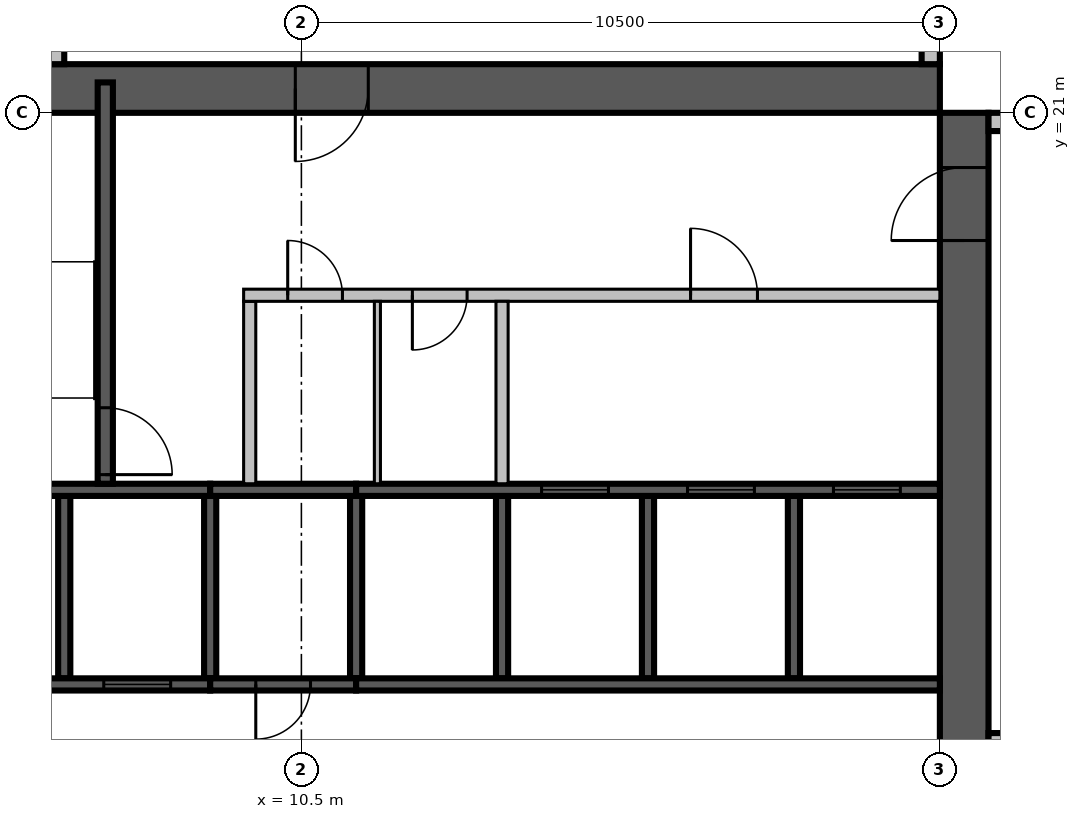
"""IFC4 building model, lengths in metres.
Left out: names, types, materials, properties, quantities, classifications, styles, units other than length and angle.
Written with IfcOpenShell. Run it as: python <this file> out.ifc"""

import sys

from ifc_helpers import new_model, si_unit, direction, frame, frame_2d, origin, place, context, subcontext, project, spatial, rectangle, extrude, source, transform, mapped, element, fill, save


model = new_model("IFC4")
c1 = context("Model", 3, precision=1e-05, world=origin(), true_north=direction((0.0, 1.0)))
c2 = subcontext(c1, "Body", "Model", "MODEL_VIEW")
j1 = project(units=[si_unit("LENGTHUNIT", "METRE"), si_unit("PLANEANGLEUNIT", "RADIAN")], contexts=[c1])
p1 = place(None, origin())
s1 = spatial("IfcSite", under=j1, at=p1, CompositionType="ELEMENT")
p2 = place(p1, origin())
s2 = spatial("IfcBuilding", under=s1, at=p2, CompositionType="ELEMENT")
p3 = place(p2, frame((0.0, 0.0, 212.0)))
s3 = spatial("IfcBuildingStorey", under=s2, at=p3, CompositionType="ELEMENT", Elevation=212.0)
m1 = source(origin(), c2, "Body", "SweptSolid", [
    extrude(rectangle(XDim=16.8, YDim=0.8, at=frame_2d((8.4, 0.0))), origin(), (0.0, 0.0, 1.0), 3.8),
])
p4 = place(p3, frame((21.4, 4.2, 0.0), z_axis=(0.0, 0.0, 1.0), x_axis=(0.0, 1.0, 0.0)))
e1 = element("IfcWall", 1, at=p4, inside=s3, PredefinedType="SHEAR", context=c2, shape_type="MappedRepresentation", body=[
    mapped(m1, transform((0.0, 0.0, 0.0), scale=1.0)),
])
m2 = source(origin(), c2, "Body", "SweptSolid", [
    extrude(rectangle(XDim=1.2, YDim=2.1, at=frame_2d((0.6, 1.05))), frame((0.0, 0.41, 0.0), z_axis=(0.0, -1.0, 0.0), x_axis=(1.0, 0.0, 0.0)), (0.0, 0.0, 1.0), 0.82),
])
p5 = place(p4, frame((14.7, 0.0, 0.0)))
e2 = element("IfcOpeningElement", 2, at=p5, cuts=e1, PredefinedType="OPENING", context=c2, shape_type="MappedRepresentation", body=[
    mapped(m2, transform((0.0, 0.0, 0.0), scale=1.0)),
])
p6 = place(p3, frame((4.2, 21.4, 0.0), z_axis=(0.0, 0.0, 1.0), x_axis=(1.0, 0.0, 0.0)))
e3 = element("IfcWall", 3, at=p6, inside=s3, PredefinedType="SHEAR", context=c2, shape_type="MappedRepresentation", body=[
    mapped(m1, transform((0.0, 0.0, 0.0), scale=1.0)),
])
p7 = place(p6, frame((6.2, 0.0, 0.0)))
e4 = element("IfcOpeningElement", 4, at=p7, cuts=e3, PredefinedType="OPENING", context=c2, shape_type="MappedRepresentation", body=[
    mapped(m2, transform((0.0, 0.0, 0.0), scale=1.0)),
])
m3 = source(origin(), c2, "Body", "SweptSolid", [
    extrude(rectangle(XDim=7.15, YDim=0.3, at=frame_2d((3.575, 0.0))), origin(), (0.0, 0.0, 1.0), 3.4),
])
p8 = place(p3, frame((21.8, 10.65, 0.0), z_axis=(0.0, 0.0, 1.0), x_axis=(1.0, 0.0, 0.0)))
e5 = element("IfcWall", 5, at=p8, inside=s3, PredefinedType="STANDARD", context=c2, shape_type="MappedRepresentation", body=[
    mapped(m3, transform((0.0, 0.0, 0.0), scale=1.0)),
])
m4 = source(origin(), c2, "Body", "SweptSolid", [
    extrude(rectangle(XDim=1.8, YDim=2.3, at=frame_2d((0.9, 1.15))), frame((0.0, 0.16, 0.0), z_axis=(0.0, -1.0, 0.0), x_axis=(1.0, 0.0, 0.0)), (0.0, 0.0, 1.0), 0.32),
])
p9 = place(p8, frame((0.4, 0.0, 0.6)))
e6 = element("IfcOpeningElement", 6, at=p9, cuts=e5, PredefinedType="OPENING", context=c2, shape_type="MappedRepresentation", body=[
    mapped(m4, transform((0.0, 0.0, 0.0), scale=1.0)),
])
m5 = source(origin(), c2, "Body", "SweptSolid", [
    extrude(rectangle(XDim=3.0, YDim=2.3, at=frame_2d((1.5, 1.15))), frame((0.0, 0.16, 0.0), z_axis=(0.0, -1.0, 0.0), x_axis=(1.0, 0.0, 0.0)), (0.0, 0.0, 1.0), 0.32),
])
p10 = place(p8, frame((4.0, 0.0, 0.6)))
e7 = element("IfcOpeningElement", 7, at=p10, cuts=e5, PredefinedType="OPENING", context=c2, shape_type="MappedRepresentation", body=[
    mapped(m5, transform((0.0, 0.0, 0.0), scale=1.0)),
])
p11 = place(p3, frame((28.95, 20.85, 0.0), z_axis=(0.0, 0.0, 1.0), x_axis=(-1.0, 0.0, 0.0)))
e8 = element("IfcWall", 8, at=p11, inside=s3, PredefinedType="STANDARD", context=c2, shape_type="MappedRepresentation", body=[
    mapped(m3, transform((0.0, 0.0, 0.0), scale=1.0)),
])
p12 = place(p11, frame((0.15, 0.0, 0.6)))
e9 = element("IfcOpeningElement", 9, at=p12, cuts=e8, PredefinedType="OPENING", context=c2, shape_type="MappedRepresentation", body=[
    mapped(m5, transform((0.0, 0.0, 0.0), scale=1.0)),
])
p13 = place(p11, frame((4.95, 0.0, 0.6)))
e10 = element("IfcOpeningElement", 10, at=p13, cuts=e8, PredefinedType="OPENING", context=c2, shape_type="MappedRepresentation", body=[
    mapped(m4, transform((0.0, 0.0, 0.0), scale=1.0)),
])
p14 = place(p3, frame((20.85, 21.8, 0.0), z_axis=(0.0, 0.0, 1.0), x_axis=(0.0, 1.0, 0.0)))
e11 = element("IfcWall", 11, at=p14, inside=s3, PredefinedType="STANDARD", context=c2, shape_type="MappedRepresentation", body=[
    mapped(m3, transform((0.0, 0.0, 0.0), scale=1.0)),
])
p15 = place(p14, frame((0.4, 0.0, 0.6)))
e12 = element("IfcOpeningElement", 12, at=p15, cuts=e11, PredefinedType="OPENING", context=c2, shape_type="MappedRepresentation", body=[
    mapped(m4, transform((0.0, 0.0, 0.0), scale=1.0)),
])
m6 = source(origin(), c2, "Body", "SweptSolid", [
    extrude(rectangle(XDim=1.0, YDim=2.1, at=frame_2d((0.5, 1.05))), frame((0.0, 0.16, 0.0), z_axis=(0.0, -1.0, 0.0), x_axis=(1.0, 0.0, 0.0)), (0.0, 0.0, 1.0), 0.32),
])
p16 = place(p14, frame((5.0, 0.0, 0.0)))
e13 = element("IfcOpeningElement", 13, at=p16, cuts=e11, PredefinedType="OPENING", context=c2, shape_type="MappedRepresentation", body=[
    mapped(m6, transform((0.0, 0.0, 0.0), scale=1.0)),
])
m7 = source(origin(), c2, "Body", "SweptSolid", [
    extrude(rectangle(XDim=16.6, YDim=0.3, at=frame_2d((8.3, 0.0))), origin(), (0.0, 0.0, 1.0), 3.4),
])
p17 = place(p3, frame((6.45, 38.4, 0.0), z_axis=(0.0, 0.0, 1.0), x_axis=(0.0, -1.0, 0.0)))
e14 = element("IfcWall", 14, at=p17, inside=s3, PredefinedType="STANDARD", context=c2, shape_type="MappedRepresentation", body=[
    mapped(m7, transform((0.0, 0.0, 0.0), scale=1.0)),
])
p18 = place(p17, frame((1.15, 0.0, 0.6)))
e15 = element("IfcOpeningElement", 15, at=p18, cuts=e14, PredefinedType="OPENING", context=c2, shape_type="MappedRepresentation", body=[
    mapped(m4, transform((0.0, 0.0, 0.0), scale=1.0)),
])
p19 = place(p17, frame((9.438, 0.0, 0.6)))
e16 = element("IfcOpeningElement", 16, at=p19, cuts=e14, PredefinedType="OPENING", context=c2, shape_type="MappedRepresentation", body=[
    mapped(m4, transform((0.0, 0.0, 0.0), scale=1.0)),
])
m8 = source(origin(), c2, "Body", "SweptSolid", [
    extrude(rectangle(XDim=1.2, YDim=2.3, at=frame_2d((0.6, 1.15))), frame((0.0, 0.16, 0.0), z_axis=(0.0, -1.0, 0.0), x_axis=(1.0, 0.0, 0.0)), (0.0, 0.0, 1.0), 0.32),
])
p20 = place(p17, frame((14.338, 0.0, 0.6)))
e17 = element("IfcOpeningElement", 17, at=p20, cuts=e14, PredefinedType="OPENING", context=c2, shape_type="MappedRepresentation", body=[
    mapped(m8, transform((0.0, 0.0, 0.0), scale=1.0)),
])
p21 = place(p17, frame((11.887, 0.0, 0.6)))
e18 = element("IfcOpeningElement", 18, at=p21, cuts=e14, PredefinedType="OPENING", context=c2, shape_type="MappedRepresentation", body=[
    mapped(m4, transform((0.0, 0.0, 0.0), scale=1.0)),
])
p22 = place(p17, frame((5.45, 0.0, 0.0)))
e19 = element("IfcOpeningElement", 19, at=p22, cuts=e14, PredefinedType="OPENING", context=c2, shape_type="MappedRepresentation", body=[
    mapped(m6, transform((0.0, 0.0, 0.0), scale=1.0)),
])
m9 = source(origin(), c2, "Body", "SweptSolid", [
    extrude(rectangle(XDim=3.0, YDim=0.2, at=frame_2d((1.5, 0.0))), origin(), (0.0, 0.0, 1.0), 3.8),
])
p23 = place(p3, frame((6.6, 11.7, 0.0), z_axis=(0.0, 0.0, 1.0), x_axis=(0.0, 1.0, 0.0)))
e20 = element("IfcWall", 20, at=p23, inside=s3, PredefinedType="SOLIDWALL", context=c2, shape_type="MappedRepresentation", body=[
    mapped(m9, transform((0.0, 0.0, 0.0), scale=1.0)),
])
m10 = source(origin(), c2, "Body", "SweptSolid", [
    extrude(rectangle(XDim=3.0, YDim=0.2, at=frame_2d((1.5, 0.0))), origin(), (0.0, 0.0, 1.0), 3.4),
])
for number, where, z_axis, x_axis in (
    (21, (9.0, 11.7, 0.0), (0.0, 0.0, 1.0), (0.0, 1.0, 0.0)),
    (22, (11.4, 11.7, 0.0), (0.0, 0.0, 1.0), (0.0, 1.0, 0.0)),
):
    element("IfcWall", number, at=place(p3, frame(where, z_axis=z_axis, x_axis=x_axis)), inside=s3, PredefinedType="SOLIDWALL", context=c2, shape_type="MappedRepresentation", body=[
        mapped(m10, transform((0.0, 0.0, 0.0), scale=1.0)),
    ])
for number, where, z_axis, x_axis in (
    (23, (13.8, 11.7, 0.0), (0.0, 0.0, 1.0), (0.0, 1.0, 0.0)),
    (24, (16.2, 11.7, 0.0), (0.0, 0.0, 1.0), (0.0, 1.0, 0.0)),
    (25, (18.6, 11.7, 0.0), (0.0, 0.0, 1.0), (0.0, 1.0, 0.0)),
):
    element("IfcWall", number, at=place(p3, frame(where, z_axis=z_axis, x_axis=x_axis)), inside=s3, PredefinedType="SOLIDWALL", context=c2, shape_type="MappedRepresentation", body=[
        mapped(m9, transform((0.0, 0.0, 0.0), scale=1.0)),
    ])
m11 = source(origin(), c2, "Body", "SweptSolid", [
    extrude(rectangle(XDim=4.8, YDim=0.2, at=frame_2d((2.4, 0.0))), origin(), (0.0, 0.0, 1.0), 3.8),
])
p24 = place(p3, frame((4.2, 11.6, 0.0), z_axis=(0.0, 0.0, 1.0), x_axis=(1.0, 0.0, 0.0)))
e26 = element("IfcWall", 26, at=p24, inside=s3, PredefinedType="SOLIDWALL", context=c2, shape_type="MappedRepresentation", body=[
    mapped(m11, transform((0.0, 0.0, 0.0), scale=1.0)),
])
m12 = source(origin(), c2, "Body", "SweptSolid", [
    extrude(rectangle(XDim=1.1, YDim=2.1, at=frame_2d((0.55, 1.05))), frame((0.0, 0.11, 0.0), z_axis=(0.0, -1.0, 0.0), x_axis=(1.0, 0.0, 0.0)), (0.0, 0.0, 1.0), 0.22),
])
p25 = place(p24, frame((0.65, 0.0, 0.0)))
e27 = element("IfcOpeningElement", 27, at=p25, cuts=e26, PredefinedType="OPENING", context=c2, shape_type="MappedRepresentation", body=[
    mapped(m12, transform((0.0, 0.0, 0.0), scale=1.0)),
])
p26 = place(p24, frame((3.05, 0.0, 0.0)))
e28 = element("IfcOpeningElement", 28, at=p26, cuts=e26, PredefinedType="OPENING", context=c2, shape_type="MappedRepresentation", body=[
    mapped(m12, transform((0.0, 0.0, 0.0), scale=1.0)),
])
m13 = source(origin(), c2, "Body", "SweptSolid", [
    extrude(rectangle(XDim=2.4, YDim=0.2, at=frame_2d((1.2, 0.0))), origin(), (0.0, 0.0, 1.0), 3.4),
])
p27 = place(p3, frame((9.0, 11.6, 0.0), z_axis=(0.0, 0.0, 1.0), x_axis=(1.0, 0.0, 0.0)))
e29 = element("IfcWall", 29, at=p27, inside=s3, PredefinedType="SOLIDWALL", context=c2, shape_type="MappedRepresentation", body=[
    mapped(m13, transform((0.0, 0.0, 0.0), scale=1.0)),
])
m14 = source(origin(), c2, "Body", "SweptSolid", [
    extrude(rectangle(XDim=0.9, YDim=2.1, at=frame_2d((0.45, 1.05))), frame((0.0, 0.11, 0.0), z_axis=(0.0, -1.0, 0.0), x_axis=(1.0, 0.0, 0.0)), (0.0, 0.0, 1.0), 0.22),
])
p28 = place(p27, frame((0.75, 0.0, 0.0)))
e30 = element("IfcOpeningElement", 30, at=p28, cuts=e29, PredefinedType="OPENING", context=c2, shape_type="MappedRepresentation", body=[
    mapped(m14, transform((0.0, 0.0, 0.0), scale=1.0)),
])
m15 = source(origin(), c2, "Body", "SweptSolid", [
    extrude(rectangle(XDim=9.6, YDim=0.2, at=frame_2d((4.8, 0.0))), origin(), (0.0, 0.0, 1.0), 3.8),
])
p29 = place(p3, frame((11.4, 11.6, 0.0), z_axis=(0.0, 0.0, 1.0), x_axis=(1.0, 0.0, 0.0)))
e31 = element("IfcWall", 31, at=p29, inside=s3, PredefinedType="SOLIDWALL", context=c2, shape_type="MappedRepresentation", body=[
    mapped(m15, transform((0.0, 0.0, 0.0), scale=1.0)),
])
p30 = place(p3, frame((4.2, 14.8, 0.0), z_axis=(0.0, 0.0, 1.0), x_axis=(1.0, 0.0, 0.0)))
e32 = element("IfcWall", 32, at=p30, inside=s3, PredefinedType="SOLIDWALL", context=c2, shape_type="MappedRepresentation", body=[
    mapped(m11, transform((0.0, 0.0, 0.0), scale=1.0)),
])
p31 = place(p3, frame((9.0, 14.8, 0.0), z_axis=(0.0, 0.0, 1.0), x_axis=(1.0, 0.0, 0.0)))
e33 = element("IfcWall", 33, at=p31, inside=s3, PredefinedType="SOLIDWALL", context=c2, shape_type="MappedRepresentation", body=[
    mapped(m13, transform((0.0, 0.0, 0.0), scale=1.0)),
])
p32 = place(p3, frame((11.4, 14.8, 0.0), z_axis=(0.0, 0.0, 1.0), x_axis=(1.0, 0.0, 0.0)))
e34 = element("IfcWall", 34, at=p32, inside=s3, PredefinedType="SOLIDWALL", context=c2, shape_type="MappedRepresentation", body=[
    mapped(m15, transform((0.0, 0.0, 0.0), scale=1.0)),
])
p33 = place(p32, frame((3.05, 0.0, 0.0)))
e35 = element("IfcOpeningElement", 35, at=p33, cuts=e34, PredefinedType="OPENING", context=c2, shape_type="MappedRepresentation", body=[
    mapped(m12, transform((0.0, 0.0, 0.0), scale=1.0)),
])
p34 = place(p32, frame((5.45, 0.0, 0.0)))
e36 = element("IfcOpeningElement", 36, at=p34, cuts=e34, PredefinedType="OPENING", context=c2, shape_type="MappedRepresentation", body=[
    mapped(m12, transform((0.0, 0.0, 0.0), scale=1.0)),
])
p35 = place(p32, frame((7.85, 0.0, 0.0)))
e37 = element("IfcOpeningElement", 37, at=p35, cuts=e34, PredefinedType="OPENING", context=c2, shape_type="MappedRepresentation", body=[
    mapped(m12, transform((0.0, 0.0, 0.0), scale=1.0)),
])
m16 = source(origin(), c2, "Body", "SweptSolid", [
    extrude(rectangle(XDim=6.6, YDim=0.25, at=frame_2d((3.3, 0.0))), origin(), (0.0, 0.0, 1.0), 3.4),
])
p36 = place(p3, frame((7.275, 14.9, 0.0), z_axis=(0.0, 0.0, 1.0), x_axis=(0.0, 1.0, 0.0)))
e38 = element("IfcWall", 38, at=p36, inside=s3, PredefinedType="SOLIDWALL", context=c2, shape_type="MappedRepresentation", body=[
    mapped(m16, transform((0.0, 0.0, 0.0), scale=1.0)),
])
m17 = source(origin(), c2, "Body", "SweptSolid", [
    extrude(rectangle(XDim=1.1, YDim=2.1, at=frame_2d((0.55, 1.05))), frame((0.0, 0.135, 0.0), z_axis=(0.0, -1.0, 0.0), x_axis=(1.0, 0.0, 0.0)), (0.0, 0.0, 1.0), 0.27),
])
p37 = place(p36, frame((0.15, 0.0, 0.0)))
e39 = element("IfcOpeningElement", 39, at=p37, cuts=e38, PredefinedType="OPENING", context=c2, shape_type="MappedRepresentation", body=[
    mapped(m17, transform((0.0, 0.0, 0.0), scale=1.0)),
])
m18 = source(origin(), c2, "Body", "SweptSolid", [
    extrude(rectangle(XDim=3.0, YDim=0.2, at=frame_2d((1.5, 0.0))), origin(), (0.0, 0.0, 1.0), 3.4),
])
p38 = place(p3, frame((9.65, 14.9, 0.0), z_axis=(0.0, 0.0, 1.0), x_axis=(0.0, 1.0, 0.0)))
e40 = element("IfcWall", 40, at=p38, inside=s3, PredefinedType="PARTITIONING", context=c2, shape_type="MappedRepresentation", body=[
    mapped(m18, transform((0.0, 0.0, 0.0), scale=1.0)),
])
m19 = source(origin(), c2, "Body", "SweptSolid", [
    extrude(rectangle(XDim=11.45, YDim=0.2, at=frame_2d((5.725, 0.0))), origin(), (0.0, 0.0, 1.0), 3.4),
])
p39 = place(p3, frame((9.55, 18.0, 0.0), z_axis=(0.0, 0.0, 1.0), x_axis=(1.0, 0.0, 0.0)))
e41 = element("IfcWall", 41, at=p39, inside=s3, PredefinedType="PARTITIONING", context=c2, shape_type="MappedRepresentation", body=[
    mapped(m19, transform((0.0, 0.0, 0.0), scale=1.0)),
])
p40 = place(p39, frame((0.725, 0.0, 0.0)))
e42 = element("IfcOpeningElement", 42, at=p40, cuts=e41, PredefinedType="OPENING", context=c2, shape_type="MappedRepresentation", body=[
    mapped(m14, transform((0.0, 0.0, 0.0), scale=1.0)),
])
p41 = place(p39, frame((2.775, 0.0, 0.0)))
e43 = element("IfcOpeningElement", 43, at=p41, cuts=e41, PredefinedType="OPENING", context=c2, shape_type="MappedRepresentation", body=[
    mapped(m14, transform((0.0, 0.0, 0.0), scale=1.0)),
])
p42 = place(p39, frame((7.35, 0.0, 0.0)))
e44 = element("IfcOpeningElement", 44, at=p42, cuts=e41, PredefinedType="OPENING", context=c2, shape_type="MappedRepresentation", body=[
    mapped(m12, transform((0.0, 0.0, 0.0), scale=1.0)),
])
p43 = place(p3, frame((13.8, 14.9, 0.0), z_axis=(0.0, 0.0, 1.0), x_axis=(0.0, 1.0, 0.0)))
e45 = element("IfcWall", 45, at=p43, inside=s3, PredefinedType="PARTITIONING", context=c2, shape_type="MappedRepresentation", body=[
    mapped(m18, transform((0.0, 0.0, 0.0), scale=1.0)),
])
m20 = source(origin(), c2, "Body", "SweptSolid", [
    extrude(rectangle(XDim=3.0, YDim=0.1, at=frame_2d((1.5, 0.0))), origin(), (0.0, 0.0, 1.0), 3.4),
])
p44 = place(p3, frame((11.75, 14.9, 0.0), z_axis=(0.0, 0.0, 1.0), x_axis=(0.0, 1.0, 0.0)))
e46 = element("IfcWall", 46, at=p44, inside=s3, PredefinedType="PARTITIONING", context=c2, shape_type="MappedRepresentation", body=[
    mapped(m20, transform((0.0, 0.0, 0.0), scale=1.0)),
])
m21 = source(origin(), c2, "Body", "SweptSolid", [
    extrude(rectangle(XDim=1.1, YDim=2.1, at=frame_2d((0.55, 1.05))), frame((0.0, 0.025, 0.0), z_axis=(0.0, -1.0, 0.0), x_axis=(1.0, 0.0, 0.0)), (0.0, 0.0, 1.0), 0.05),
])
p45 = place(p26, origin())
e47 = element("IfcDoor", 47, at=p45, inside=s3, OperationType="SLIDING_TO_LEFT", PredefinedType="DOOR", context=c2, shape_type="MappedRepresentation", body=[
    mapped(m21, transform((0.0, 0.0, 0.0), scale=1.0)),
])
fill(e28, e47)
m22 = source(origin(), c2, "Body", "SweptSolid", [
    extrude(rectangle(XDim=0.9, YDim=2.1, at=frame_2d((0.45, 1.05))), frame((0.0, 0.025, 0.0), z_axis=(0.0, -1.0, 0.0), x_axis=(1.0, 0.0, 0.0)), (0.0, 0.0, 1.0), 0.05),
])
p46 = place(p28, origin())
e48 = element("IfcDoor", 48, at=p46, inside=s3, OperationType="SINGLE_SWING_RIGHT", PredefinedType="DOOR", context=c2, shape_type="MappedRepresentation", body=[
    mapped(m22, transform((0.0, 0.0, 0.0), scale=1.0)),
])
fill(e30, e48)
p47 = place(p33, origin())
e49 = element("IfcDoor", 49, at=p47, inside=s3, OperationType="SLIDING_TO_LEFT", PredefinedType="DOOR", context=c2, shape_type="MappedRepresentation", body=[
    mapped(m21, transform((0.0, 0.0, 0.0), scale=1.0)),
])
fill(e35, e49)
p48 = place(p34, origin())
e50 = element("IfcDoor", 50, at=p48, inside=s3, OperationType="SLIDING_TO_LEFT", PredefinedType="DOOR", context=c2, shape_type="MappedRepresentation", body=[
    mapped(m21, transform((0.0, 0.0, 0.0), scale=1.0)),
])
fill(e36, e50)
p49 = place(p35, origin())
e51 = element("IfcDoor", 51, at=p49, inside=s3, OperationType="SLIDING_TO_LEFT", PredefinedType="DOOR", context=c2, shape_type="MappedRepresentation", body=[
    mapped(m21, transform((0.0, 0.0, 0.0), scale=1.0)),
])
fill(e37, e51)
p50 = place(p37, origin())
e52 = element("IfcDoor", 52, at=p50, inside=s3, OperationType="SINGLE_SWING_RIGHT", PredefinedType="DOOR", context=c2, shape_type="MappedRepresentation", body=[
    mapped(m21, transform((0.0, 0.0, 0.0), scale=1.0)),
])
fill(e39, e52)
p51 = place(p40, origin())
e53 = element("IfcDoor", 53, at=p51, inside=s3, OperationType="SINGLE_SWING_LEFT", PredefinedType="DOOR", context=c2, shape_type="MappedRepresentation", body=[
    mapped(m22, transform((0.0, 0.0, 0.0), scale=1.0)),
])
fill(e42, e53)
p52 = place(p41, origin())
e54 = element("IfcDoor", 54, at=p52, inside=s3, OperationType="SINGLE_SWING_RIGHT", PredefinedType="DOOR", context=c2, shape_type="MappedRepresentation", body=[
    mapped(m22, transform((0.0, 0.0, 0.0), scale=1.0)),
])
fill(e43, e54)
p53 = place(p42, origin())
e55 = element("IfcDoor", 55, at=p53, inside=s3, OperationType="SINGLE_SWING_LEFT", PredefinedType="DOOR", context=c2, shape_type="MappedRepresentation", body=[
    mapped(m21, transform((0.0, 0.0, 0.0), scale=1.0)),
])
fill(e44, e55)
m23 = source(origin(), c2, "Body", "SweptSolid", [
    extrude(rectangle(XDim=1.2, YDim=2.1, at=frame_2d((0.6, 1.05))), frame((0.0, 0.025, 0.0), z_axis=(0.0, -1.0, 0.0), x_axis=(1.0, 0.0, 0.0)), (0.0, 0.0, 1.0), 0.05),
])
p54 = place(p7, origin())
e56 = element("IfcDoor", 56, at=p54, inside=s3, OperationType="SINGLE_SWING_RIGHT", PredefinedType="DOOR", context=c2, shape_type="MappedRepresentation", body=[
    mapped(m23, transform((0.0, 0.0, 0.0), scale=1.0)),
])
fill(e4, e56)
p55 = place(p5, origin())
e57 = element("IfcDoor", 57, at=p55, inside=s3, OperationType="SINGLE_SWING_LEFT", PredefinedType="DOOR", context=c2, shape_type="MappedRepresentation", body=[
    mapped(m23, transform((0.0, 0.0, 0.0), scale=1.0)),
])
fill(e2, e57)
save(model, sys.argv[1])
